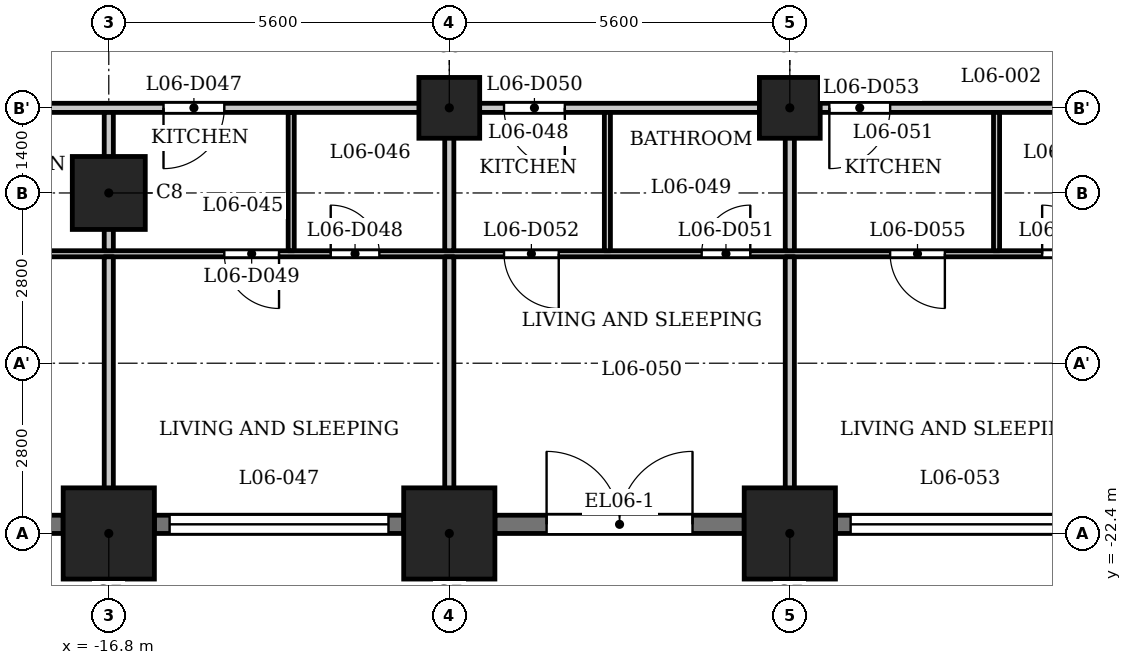
"""IFC4 building model, lengths in metres.
Left out: names, types, materials, properties, quantities, classifications, styles, units other than length and angle.
Written with IfcOpenShell. Run it as: python <this file> out.ifc"""

import sys

from ifc_helpers import new_model, si_unit, direction, frame, frame_2d, origin, origin_2d, place, context, subcontext, project, spatial, rectangle, extrude, element, fill, save


model = new_model("IFC4")
c1 = context("Model", 3, precision=1e-05, world=origin(), true_north=direction((0.0, 1.0)))
c2 = subcontext(c1, "Body", "Model", "MODEL_VIEW")
j1 = project(units=[si_unit("LENGTHUNIT", "METRE"), si_unit("PLANEANGLEUNIT", "RADIAN")], contexts=[c1])
p1 = place(None, origin())
s1 = spatial("IfcSite", under=j1, at=p1, CompositionType="ELEMENT")
p2 = place(p1, origin())
s2 = spatial("IfcBuilding", under=s1, at=p2, CompositionType="ELEMENT")
p3 = place(p2, frame((0.0, 0.0, 30.5)))
s3 = spatial("IfcBuildingStorey", under=s2, at=p3, CompositionType="ELEMENT", Elevation=30.5)
for number, where, z_axis, x_axis in (
    (1, (-16.8, -22.4, 0.0), (0.0, 0.0, 1.0), (1.0, 0.0, 0.0)),
    (2, (-11.2, -22.4, 0.0), (0.0, 0.0, 1.0), (1.0, 0.0, 0.0)),
    (3, (-5.6, -22.4, 0.0), (0.0, 0.0, 1.0), (1.0, 0.0, 0.0)),
):
    element("IfcColumn", number, at=place(p3, frame(where, z_axis=z_axis, x_axis=x_axis)), inside=s3, PredefinedType="COLUMN", context=c2, shape_type="SweptSolid", body=[
        extrude(rectangle(XDim=1.5, YDim=1.5, at=origin_2d()), origin(), (0.0, 0.0, 1.0), 3.5),
    ])
p4 = place(p3, frame((-16.8, -16.8, 0.0), z_axis=(0.0, 0.0, 1.0), x_axis=(1.0, 0.0, 0.0)))
e4 = element("IfcColumn", 4, at=p4, inside=s3, PredefinedType="COLUMN", context=c2, shape_type="SweptSolid", body=[
    extrude(rectangle(XDim=1.2, YDim=1.2, at=origin_2d()), origin(), (0.0, 0.0, 1.0), 3.5),
])
for number, where, z_axis, x_axis in (
    (5, (-11.2, -15.4, 0.0), (0.0, 0.0, 1.0), (1.0, 0.0, 0.0)),
    (6, (-5.6, -15.4, 0.0), (0.0, 0.0, 1.0), (1.0, 0.0, 0.0)),
):
    element("IfcColumn", number, at=place(p3, frame(where, z_axis=z_axis, x_axis=x_axis)), inside=s3, PredefinedType="COLUMN", context=c2, shape_type="SweptSolid", body=[
        extrude(rectangle(XDim=1.0, YDim=1.0, at=origin_2d()), origin(), (0.0, 0.0, 1.0), 3.5),
    ])
p5 = place(p3, frame((-20.0, -22.25, 0.0), z_axis=(0.0, 0.0, 1.0), x_axis=(1.0, 0.0, 0.0)))
e7 = element("IfcWall", 7, at=p5, inside=s3, PredefinedType="SOLIDWALL", context=c2, shape_type="SweptSolid", body=[
    extrude(rectangle(XDim=2.45, YDim=0.3, at=frame_2d((1.225, 0.0))), origin(), (0.0, 0.0, 1.0), 2.35),
])
p6 = place(p5, frame((0.625, 0.0, 0.6)))
e8 = element("IfcOpeningElement", 8, at=p6, cuts=e7, PredefinedType="OPENING", context=c2, shape_type="SweptSolid", body=[
    extrude(rectangle(XDim=1.2, YDim=1.55, at=frame_2d((0.6, 0.775))), frame((0.0, 0.16, 0.0), z_axis=(0.0, -1.0, 0.0), x_axis=(1.0, 0.0, 0.0)), (0.0, 0.0, 1.0), 0.32),
])
p7 = place(p3, frame((-16.05, -22.25, 0.0), z_axis=(0.0, 0.0, 1.0), x_axis=(1.0, 0.0, 0.0)))
e9 = element("IfcWall", 9, at=p7, inside=s3, PredefinedType="SOLIDWALL", context=c2, shape_type="SweptSolid", body=[
    extrude(rectangle(XDim=4.1, YDim=0.3, at=frame_2d((2.05, 0.0))), origin(), (0.0, 0.0, 1.0), 2.35),
])
p8 = place(p7, frame((0.25, 0.0, 1.2)))
e10 = element("IfcOpeningElement", 10, at=p8, cuts=e9, PredefinedType="OPENING", context=c2, shape_type="SweptSolid", body=[
    extrude(rectangle(XDim=3.6, YDim=0.95, at=frame_2d((1.8, 0.475))), frame((0.0, 0.16, 0.0), z_axis=(0.0, -1.0, 0.0), x_axis=(1.0, 0.0, 0.0)), (0.0, 0.0, 1.0), 0.32),
])
p9 = place(p3, frame((-10.45, -22.25, 0.0), z_axis=(0.0, 0.0, 1.0), x_axis=(1.0, 0.0, 0.0)))
e11 = element("IfcWall", 11, at=p9, inside=s3, PredefinedType="SOLIDWALL", context=c2, shape_type="SweptSolid", body=[
    extrude(rectangle(XDim=4.1, YDim=0.3, at=frame_2d((2.05, 0.0))), origin(), (0.0, 0.0, 1.0), 2.35),
])
p10 = place(p9, frame((0.85, 0.0, 0.0)))
e12 = element("IfcOpeningElement", 12, at=p10, cuts=e11, PredefinedType="OPENING", context=c2, shape_type="SweptSolid", body=[
    extrude(rectangle(XDim=2.4, YDim=2.3, at=frame_2d((1.2, 1.15))), frame((0.0, 0.16, 0.0), z_axis=(0.0, -1.0, 0.0), x_axis=(1.0, 0.0, 0.0)), (0.0, 0.0, 1.0), 0.32),
])
p11 = place(p3, frame((-4.85, -22.25, 0.0), z_axis=(0.0, 0.0, 1.0), x_axis=(1.0, 0.0, 0.0)))
e13 = element("IfcWall", 13, at=p11, inside=s3, PredefinedType="SOLIDWALL", context=c2, shape_type="SweptSolid", body=[
    extrude(rectangle(XDim=4.1, YDim=0.3, at=frame_2d((2.05, 0.0))), origin(), (0.0, 0.0, 1.0), 2.35),
])
p12 = place(p11, frame((0.25, 0.0, 1.2)))
e14 = element("IfcOpeningElement", 14, at=p12, cuts=e13, PredefinedType="OPENING", context=c2, shape_type="SweptSolid", body=[
    extrude(rectangle(XDim=3.6, YDim=0.95, at=frame_2d((1.8, 0.475))), frame((0.0, 0.16, 0.0), z_axis=(0.0, -1.0, 0.0), x_axis=(1.0, 0.0, 0.0)), (0.0, 0.0, 1.0), 0.32),
])
p13 = place(p3, frame((-26.394, -17.8, 0.0), z_axis=(0.0, 0.0, 1.0), x_axis=(1.0, 0.0, 0.0)))
e15 = element("IfcWall", 15, at=p13, inside=s3, PredefinedType="PARTITIONING", context=c2, shape_type="SweptSolid", body=[
    extrude(rectangle(XDim=53.126, YDim=0.1, at=frame_2d((26.563, 0.0))), origin(), (0.0, 0.0, 1.0), 3.2),
])
p14 = place(p13, frame((0.794, 0.0, 0.0)))
e16 = element("IfcOpeningElement", 16, at=p14, cuts=e15, PredefinedType="OPENING", context=c2, shape_type="SweptSolid", body=[
    extrude(rectangle(XDim=0.8, YDim=2.1, at=frame_2d((0.4, 1.05))), frame((0.0, 0.06, 0.0), z_axis=(0.0, -1.0, 0.0), x_axis=(1.0, 0.0, 0.0)), (0.0, 0.0, 1.0), 0.12),
])
p15 = place(p13, frame((5.644, 0.0, 0.0)))
e17 = element("IfcOpeningElement", 17, at=p15, cuts=e15, PredefinedType="OPENING", context=c2, shape_type="SweptSolid", body=[
    extrude(rectangle(XDim=0.9, YDim=2.1, at=frame_2d((0.45, 1.05))), frame((0.0, 0.06, 0.0), z_axis=(0.0, -1.0, 0.0), x_axis=(1.0, 0.0, 0.0)), (0.0, 0.0, 1.0), 0.12),
])
p16 = place(p13, frame((13.244, 0.0, 0.0)))
e18 = element("IfcOpeningElement", 18, at=p16, cuts=e15, PredefinedType="OPENING", context=c2, shape_type="SweptSolid", body=[
    extrude(rectangle(XDim=0.8, YDim=2.1, at=frame_2d((0.4, 1.05))), frame((0.0, 0.06, 0.0), z_axis=(0.0, -1.0, 0.0), x_axis=(1.0, 0.0, 0.0)), (0.0, 0.0, 1.0), 0.12),
])
p17 = place(p13, frame((11.494, 0.0, 0.0)))
e19 = element("IfcOpeningElement", 19, at=p17, cuts=e15, PredefinedType="OPENING", context=c2, shape_type="SweptSolid", body=[
    extrude(rectangle(XDim=0.9, YDim=2.1, at=frame_2d((0.45, 1.05))), frame((0.0, 0.06, 0.0), z_axis=(0.0, -1.0, 0.0), x_axis=(1.0, 0.0, 0.0)), (0.0, 0.0, 1.0), 0.12),
])
p18 = place(p13, frame((19.344, 0.0, 0.0)))
e20 = element("IfcOpeningElement", 20, at=p18, cuts=e15, PredefinedType="OPENING", context=c2, shape_type="SweptSolid", body=[
    extrude(rectangle(XDim=0.8, YDim=2.1, at=frame_2d((0.4, 1.05))), frame((0.0, 0.06, 0.0), z_axis=(0.0, -1.0, 0.0), x_axis=(1.0, 0.0, 0.0)), (0.0, 0.0, 1.0), 0.12),
])
p19 = place(p13, frame((16.094, 0.0, 0.0)))
e21 = element("IfcOpeningElement", 21, at=p19, cuts=e15, PredefinedType="OPENING", context=c2, shape_type="SweptSolid", body=[
    extrude(rectangle(XDim=0.9, YDim=2.1, at=frame_2d((0.45, 1.05))), frame((0.0, 0.06, 0.0), z_axis=(0.0, -1.0, 0.0), x_axis=(1.0, 0.0, 0.0)), (0.0, 0.0, 1.0), 0.12),
])
p20 = place(p13, frame((24.944, 0.0, 0.0)))
e22 = element("IfcOpeningElement", 22, at=p20, cuts=e15, PredefinedType="OPENING", context=c2, shape_type="SweptSolid", body=[
    extrude(rectangle(XDim=0.8, YDim=2.1, at=frame_2d((0.4, 1.05))), frame((0.0, 0.06, 0.0), z_axis=(0.0, -1.0, 0.0), x_axis=(1.0, 0.0, 0.0)), (0.0, 0.0, 1.0), 0.12),
])
p21 = place(p13, frame((22.444, 0.0, 0.0)))
e23 = element("IfcOpeningElement", 23, at=p21, cuts=e15, PredefinedType="OPENING", context=c2, shape_type="SweptSolid", body=[
    extrude(rectangle(XDim=0.9, YDim=2.1, at=frame_2d((0.45, 1.05))), frame((0.0, 0.06, 0.0), z_axis=(0.0, -1.0, 0.0), x_axis=(1.0, 0.0, 0.0)), (0.0, 0.0, 1.0), 0.12),
])
p22 = place(p13, frame((30.294, 0.0, 0.0)))
e24 = element("IfcOpeningElement", 24, at=p22, cuts=e15, PredefinedType="OPENING", context=c2, shape_type="SweptSolid", body=[
    extrude(rectangle(XDim=0.8, YDim=2.1, at=frame_2d((0.4, 1.05))), frame((0.0, 0.06, 0.0), z_axis=(0.0, -1.0, 0.0), x_axis=(1.0, 0.0, 0.0)), (0.0, 0.0, 1.0), 0.12),
])
p23 = place(p13, frame((26.794, 0.0, 0.0)))
e25 = element("IfcOpeningElement", 25, at=p23, cuts=e15, PredefinedType="OPENING", context=c2, shape_type="SweptSolid", body=[
    extrude(rectangle(XDim=0.9, YDim=2.1, at=frame_2d((0.45, 1.05))), frame((0.0, 0.06, 0.0), z_axis=(0.0, -1.0, 0.0), x_axis=(1.0, 0.0, 0.0)), (0.0, 0.0, 1.0), 0.12),
])
p24 = place(p13, frame((32.744, 0.0, 0.0)))
e26 = element("IfcOpeningElement", 26, at=p24, cuts=e15, PredefinedType="OPENING", context=c2, shape_type="SweptSolid", body=[
    extrude(rectangle(XDim=0.8, YDim=2.1, at=frame_2d((0.4, 1.05))), frame((0.0, 0.06, 0.0), z_axis=(0.0, -1.0, 0.0), x_axis=(1.0, 0.0, 0.0)), (0.0, 0.0, 1.0), 0.12),
])
p25 = place(p13, frame((35.594, 0.0, 0.0)))
e27 = element("IfcOpeningElement", 27, at=p25, cuts=e15, PredefinedType="OPENING", context=c2, shape_type="SweptSolid", body=[
    extrude(rectangle(XDim=0.9, YDim=2.1, at=frame_2d((0.45, 1.05))), frame((0.0, 0.06, 0.0), z_axis=(0.0, -1.0, 0.0), x_axis=(1.0, 0.0, 0.0)), (0.0, 0.0, 1.0), 0.12),
])
p26 = place(p13, frame((39.244, 0.0, 0.0)))
e28 = element("IfcOpeningElement", 28, at=p26, cuts=e15, PredefinedType="OPENING", context=c2, shape_type="SweptSolid", body=[
    extrude(rectangle(XDim=0.9, YDim=2.1, at=frame_2d((0.45, 1.05))), frame((0.0, 0.06, 0.0), z_axis=(0.0, -1.0, 0.0), x_axis=(1.0, 0.0, 0.0)), (0.0, 0.0, 1.0), 0.12),
])
p27 = place(p13, frame((41.544, 0.0, 0.0)))
e29 = element("IfcOpeningElement", 29, at=p27, cuts=e15, PredefinedType="OPENING", context=c2, shape_type="SweptSolid", body=[
    extrude(rectangle(XDim=0.9, YDim=2.1, at=frame_2d((0.45, 1.05))), frame((0.0, 0.06, 0.0), z_axis=(0.0, -1.0, 0.0), x_axis=(1.0, 0.0, 0.0)), (0.0, 0.0, 1.0), 0.12),
])
p28 = place(p13, frame((49.362, 0.0, 0.0)))
e30 = element("IfcOpeningElement", 30, at=p28, cuts=e15, PredefinedType="OPENING", context=c2, shape_type="SweptSolid", body=[
    extrude(rectangle(XDim=0.8, YDim=2.1, at=frame_2d((0.4, 1.05))), frame((0.0, 0.06, 0.0), z_axis=(0.0, -1.0, 0.0), x_axis=(1.0, 0.0, 0.0)), (0.0, 0.0, 1.0), 0.12),
])
p29 = place(p13, frame((45.094, 0.0, 0.0)))
e31 = element("IfcOpeningElement", 31, at=p29, cuts=e15, PredefinedType="OPENING", context=c2, shape_type="SweptSolid", body=[
    extrude(rectangle(XDim=0.9, YDim=2.1, at=frame_2d((0.45, 1.05))), frame((0.0, 0.06, 0.0), z_axis=(0.0, -1.0, 0.0), x_axis=(1.0, 0.0, 0.0)), (0.0, 0.0, 1.0), 0.12),
])
p30 = place(p3, frame((-27.484, -15.4, 0.0), z_axis=(0.0, 0.0, 1.0), x_axis=(1.0, 0.0, 0.0)))
e32 = element("IfcWall", 32, at=p30, inside=s3, PredefinedType="PARTITIONING", context=c2, shape_type="SweptSolid", body=[
    extrude(rectangle(XDim=54.968, YDim=0.15, at=frame_2d((27.484, 0.0))), origin(), (0.0, 0.0, 1.0), 3.2),
])
p31 = place(p30, frame((5.734, 0.0, 0.0)))
e33 = element("IfcOpeningElement", 33, at=p31, cuts=e32, PredefinedType="OPENING", context=c2, shape_type="SweptSolid", body=[
    extrude(rectangle(XDim=1.0, YDim=2.1, at=frame_2d((0.5, 1.05))), frame((0.0, 0.085, 0.0), z_axis=(0.0, -1.0, 0.0), x_axis=(1.0, 0.0, 0.0)), (0.0, 0.0, 1.0), 0.17),
])
p32 = place(p30, frame((11.584, 0.0, 0.0)))
e34 = element("IfcOpeningElement", 34, at=p32, cuts=e32, PredefinedType="OPENING", context=c2, shape_type="SweptSolid", body=[
    extrude(rectangle(XDim=1.0, YDim=2.1, at=frame_2d((0.5, 1.05))), frame((0.0, 0.085, 0.0), z_axis=(0.0, -1.0, 0.0), x_axis=(1.0, 0.0, 0.0)), (0.0, 0.0, 1.0), 0.17),
])
p33 = place(p30, frame((17.184, 0.0, 0.0)))
e35 = element("IfcOpeningElement", 35, at=p33, cuts=e32, PredefinedType="OPENING", context=c2, shape_type="SweptSolid", body=[
    extrude(rectangle(XDim=1.0, YDim=2.1, at=frame_2d((0.5, 1.05))), frame((0.0, 0.085, 0.0), z_axis=(0.0, -1.0, 0.0), x_axis=(1.0, 0.0, 0.0)), (0.0, 0.0, 1.0), 0.17),
])
p34 = place(p30, frame((22.534, 0.0, 0.0)))
e36 = element("IfcOpeningElement", 36, at=p34, cuts=e32, PredefinedType="OPENING", context=c2, shape_type="SweptSolid", body=[
    extrude(rectangle(XDim=1.0, YDim=2.1, at=frame_2d((0.5, 1.05))), frame((0.0, 0.085, 0.0), z_axis=(0.0, -1.0, 0.0), x_axis=(1.0, 0.0, 0.0)), (0.0, 0.0, 1.0), 0.17),
])
p35 = place(p30, frame((28.884, 0.0, 0.0)))
e37 = element("IfcOpeningElement", 37, at=p35, cuts=e32, PredefinedType="OPENING", context=c2, shape_type="SweptSolid", body=[
    extrude(rectangle(XDim=1.0, YDim=2.1, at=frame_2d((0.5, 1.05))), frame((0.0, 0.085, 0.0), z_axis=(0.0, -1.0, 0.0), x_axis=(1.0, 0.0, 0.0)), (0.0, 0.0, 1.0), 0.17),
])
p36 = place(p30, frame((39.334, 0.0, 0.0)))
e38 = element("IfcOpeningElement", 38, at=p36, cuts=e32, PredefinedType="OPENING", context=c2, shape_type="SweptSolid", body=[
    extrude(rectangle(XDim=1.0, YDim=2.1, at=frame_2d((0.5, 1.05))), frame((0.0, 0.085, 0.0), z_axis=(0.0, -1.0, 0.0), x_axis=(1.0, 0.0, 0.0)), (0.0, 0.0, 1.0), 0.17),
])
p37 = place(p30, frame((45.184, 0.0, 0.0)))
e39 = element("IfcOpeningElement", 39, at=p37, cuts=e32, PredefinedType="OPENING", context=c2, shape_type="SweptSolid", body=[
    extrude(rectangle(XDim=1.0, YDim=2.1, at=frame_2d((0.5, 1.05))), frame((0.0, 0.085, 0.0), z_axis=(0.0, -1.0, 0.0), x_axis=(1.0, 0.0, 0.0)), (0.0, 0.0, 1.0), 0.17),
])
p38 = place(p3, frame((-16.8, -23.13, 0.0), z_axis=(0.0, 0.0, 1.0), x_axis=(0.0, 1.0, 0.0)))
e40 = element("IfcWall", 40, at=p38, inside=s3, PredefinedType="PARTITIONING", context=c2, shape_type="SweptSolid", body=[
    extrude(rectangle(XDim=5.28, YDim=0.15, at=frame_2d((2.64, 0.0))), origin(), (0.0, 0.0, 1.0), 3.2),
])
p39 = place(p3, frame((-16.8, -17.75, 0.0), z_axis=(0.0, 0.0, 1.0), x_axis=(0.0, 1.0, 0.0)))
e41 = element("IfcWall", 41, at=p39, inside=s3, PredefinedType="PARTITIONING", context=c2, shape_type="SweptSolid", body=[
    extrude(rectangle(XDim=2.275, YDim=0.15, at=frame_2d((1.137, 0.0))), origin(), (0.0, 0.0, 1.0), 3.2),
])
p40 = place(p3, frame((-13.8, -17.75, 0.0), z_axis=(0.0, 0.0, 1.0), x_axis=(0.0, 1.0, 0.0)))
e42 = element("IfcWall", 42, at=p40, inside=s3, PredefinedType="PARTITIONING", context=c2, shape_type="SweptSolid", body=[
    extrude(rectangle(XDim=2.275, YDim=0.1, at=frame_2d((1.137, 0.0))), origin(), (0.0, 0.0, 1.0), 3.2),
])
p41 = place(p3, frame((-11.2, -23.13, 0.0), z_axis=(0.0, 0.0, 1.0), x_axis=(0.0, 1.0, 0.0)))
e43 = element("IfcWall", 43, at=p41, inside=s3, PredefinedType="PARTITIONING", context=c2, shape_type="SweptSolid", body=[
    extrude(rectangle(XDim=5.28, YDim=0.15, at=frame_2d((2.64, 0.0))), origin(), (0.0, 0.0, 1.0), 3.2),
])
p42 = place(p3, frame((-11.2, -17.75, 0.0), z_axis=(0.0, 0.0, 1.0), x_axis=(0.0, 1.0, 0.0)))
e44 = element("IfcWall", 44, at=p42, inside=s3, PredefinedType="PARTITIONING", context=c2, shape_type="SweptSolid", body=[
    extrude(rectangle(XDim=2.275, YDim=0.15, at=frame_2d((1.137, 0.0))), origin(), (0.0, 0.0, 1.0), 3.2),
])
p43 = place(p3, frame((-8.6, -17.75, 0.0), z_axis=(0.0, 0.0, 1.0), x_axis=(0.0, 1.0, 0.0)))
e45 = element("IfcWall", 45, at=p43, inside=s3, PredefinedType="PARTITIONING", context=c2, shape_type="SweptSolid", body=[
    extrude(rectangle(XDim=2.275, YDim=0.1, at=frame_2d((1.137, 0.0))), origin(), (0.0, 0.0, 1.0), 3.2),
])
p44 = place(p3, frame((-5.6, -23.13, 0.0), z_axis=(0.0, 0.0, 1.0), x_axis=(0.0, 1.0, 0.0)))
e46 = element("IfcWall", 46, at=p44, inside=s3, PredefinedType="PARTITIONING", context=c2, shape_type="SweptSolid", body=[
    extrude(rectangle(XDim=5.28, YDim=0.15, at=frame_2d((2.64, 0.0))), origin(), (0.0, 0.0, 1.0), 3.2),
])
p45 = place(p3, frame((-5.6, -17.75, 0.0), z_axis=(0.0, 0.0, 1.0), x_axis=(0.0, 1.0, 0.0)))
e47 = element("IfcWall", 47, at=p45, inside=s3, PredefinedType="PARTITIONING", context=c2, shape_type="SweptSolid", body=[
    extrude(rectangle(XDim=2.275, YDim=0.15, at=frame_2d((1.137, 0.0))), origin(), (0.0, 0.0, 1.0), 3.2),
])
p46 = place(p3, frame((-2.2, -17.75, 0.0), z_axis=(0.0, 0.0, 1.0), x_axis=(0.0, 1.0, 0.0)))
e48 = element("IfcWall", 48, at=p46, inside=s3, PredefinedType="PARTITIONING", context=c2, shape_type="SweptSolid", body=[
    extrude(rectangle(XDim=2.275, YDim=0.1, at=frame_2d((1.137, 0.0))), origin(), (0.0, 0.0, 1.0), 3.2),
])
p47 = place(p10, origin())
e49 = element("IfcDoor", 49, at=p47, inside=s3, OperationType="SINGLE_SWING_LEFT", PredefinedType="DOOR", context=c2, shape_type="SweptSolid", body=[
    extrude(rectangle(XDim=2.4, YDim=2.3, at=frame_2d((1.2, 1.15))), frame((0.0, 0.025, 0.0), z_axis=(0.0, -1.0, 0.0), x_axis=(1.0, 0.0, 0.0)), (0.0, 0.0, 1.0), 0.05),
])
fill(e12, e49)
p48 = place(p32, origin())
e50 = element("IfcDoor", 50, at=p48, inside=s3, OperationType="SINGLE_SWING_LEFT", PredefinedType="DOOR", context=c2, shape_type="SweptSolid", body=[
    extrude(rectangle(XDim=1.0, YDim=2.1, at=frame_2d((0.5, 1.05))), frame((0.0, 0.025, 0.0), z_axis=(0.0, -1.0, 0.0), x_axis=(1.0, 0.0, 0.0)), (0.0, 0.0, 1.0), 0.05),
])
fill(e34, e50)
p49 = place(p16, origin())
e51 = element("IfcDoor", 51, at=p49, inside=s3, OperationType="SINGLE_SWING_RIGHT", PredefinedType="DOOR", context=c2, shape_type="SweptSolid", body=[
    extrude(rectangle(XDim=0.8, YDim=2.1, at=frame_2d((0.4, 1.05))), frame((0.0, 0.025, 0.0), z_axis=(0.0, -1.0, 0.0), x_axis=(1.0, 0.0, 0.0)), (0.0, 0.0, 1.0), 0.05),
])
fill(e18, e51)
p50 = place(p17, origin())
e52 = element("IfcDoor", 52, at=p50, inside=s3, OperationType="SINGLE_SWING_RIGHT", PredefinedType="DOOR", context=c2, shape_type="SweptSolid", body=[
    extrude(rectangle(XDim=0.9, YDim=2.1, at=frame_2d((0.45, 1.05))), frame((0.0, 0.025, 0.0), z_axis=(0.0, -1.0, 0.0), x_axis=(1.0, 0.0, 0.0)), (0.0, 0.0, 1.0), 0.05),
])
fill(e19, e52)
p51 = place(p33, origin())
e53 = element("IfcDoor", 53, at=p51, inside=s3, OperationType="SINGLE_SWING_RIGHT", PredefinedType="DOOR", context=c2, shape_type="SweptSolid", body=[
    extrude(rectangle(XDim=1.0, YDim=2.1, at=frame_2d((0.5, 1.05))), frame((0.0, 0.025, 0.0), z_axis=(0.0, -1.0, 0.0), x_axis=(1.0, 0.0, 0.0)), (0.0, 0.0, 1.0), 0.05),
])
fill(e35, e53)
p52 = place(p18, origin())
e54 = element("IfcDoor", 54, at=p52, inside=s3, OperationType="SINGLE_SWING_LEFT", PredefinedType="DOOR", context=c2, shape_type="SweptSolid", body=[
    extrude(rectangle(XDim=0.8, YDim=2.1, at=frame_2d((0.4, 1.05))), frame((0.0, 0.025, 0.0), z_axis=(0.0, -1.0, 0.0), x_axis=(1.0, 0.0, 0.0)), (0.0, 0.0, 1.0), 0.05),
])
fill(e20, e54)
p53 = place(p19, origin())
e55 = element("IfcDoor", 55, at=p53, inside=s3, OperationType="SINGLE_SWING_RIGHT", PredefinedType="DOOR", context=c2, shape_type="SweptSolid", body=[
    extrude(rectangle(XDim=0.9, YDim=2.1, at=frame_2d((0.45, 1.05))), frame((0.0, 0.025, 0.0), z_axis=(0.0, -1.0, 0.0), x_axis=(1.0, 0.0, 0.0)), (0.0, 0.0, 1.0), 0.05),
])
fill(e21, e55)
p54 = place(p34, origin())
e56 = element("IfcDoor", 56, at=p54, inside=s3, OperationType="SINGLE_SWING_LEFT", PredefinedType="DOOR", context=c2, shape_type="SweptSolid", body=[
    extrude(rectangle(XDim=1.0, YDim=2.1, at=frame_2d((0.5, 1.05))), frame((0.0, 0.025, 0.0), z_axis=(0.0, -1.0, 0.0), x_axis=(1.0, 0.0, 0.0)), (0.0, 0.0, 1.0), 0.05),
])
fill(e36, e56)
p55 = place(p20, origin())
e57 = element("IfcDoor", 57, at=p55, inside=s3, OperationType="SINGLE_SWING_RIGHT", PredefinedType="DOOR", context=c2, shape_type="SweptSolid", body=[
    extrude(rectangle(XDim=0.8, YDim=2.1, at=frame_2d((0.4, 1.05))), frame((0.0, 0.025, 0.0), z_axis=(0.0, -1.0, 0.0), x_axis=(1.0, 0.0, 0.0)), (0.0, 0.0, 1.0), 0.05),
])
fill(e22, e57)
p56 = place(p21, origin())
e58 = element("IfcDoor", 58, at=p56, inside=s3, OperationType="SINGLE_SWING_RIGHT", PredefinedType="DOOR", context=c2, shape_type="SweptSolid", body=[
    extrude(rectangle(XDim=0.9, YDim=2.1, at=frame_2d((0.45, 1.05))), frame((0.0, 0.025, 0.0), z_axis=(0.0, -1.0, 0.0), x_axis=(1.0, 0.0, 0.0)), (0.0, 0.0, 1.0), 0.05),
])
fill(e23, e58)
p57 = place(p8, origin())
e59 = element("IfcWindow", 59, at=p57, inside=s3, PartitioningType="SINGLE_PANEL", PredefinedType="WINDOW", context=c2, shape_type="SweptSolid", body=[
    extrude(rectangle(XDim=3.6, YDim=0.95, at=frame_2d((1.8, 0.475))), frame((0.0, 0.03, 0.0), z_axis=(0.0, -1.0, 0.0), x_axis=(1.0, 0.0, 0.0)), (0.0, 0.0, 1.0), 0.06),
])
fill(e10, e59)
p58 = place(p12, origin())
e60 = element("IfcWindow", 60, at=p58, inside=s3, PartitioningType="SINGLE_PANEL", PredefinedType="WINDOW", context=c2, shape_type="SweptSolid", body=[
    extrude(rectangle(XDim=3.6, YDim=0.95, at=frame_2d((1.8, 0.475))), frame((0.0, 0.03, 0.0), z_axis=(0.0, -1.0, 0.0), x_axis=(1.0, 0.0, 0.0)), (0.0, 0.0, 1.0), 0.06),
])
fill(e14, e60)
save(model, sys.argv[1])
